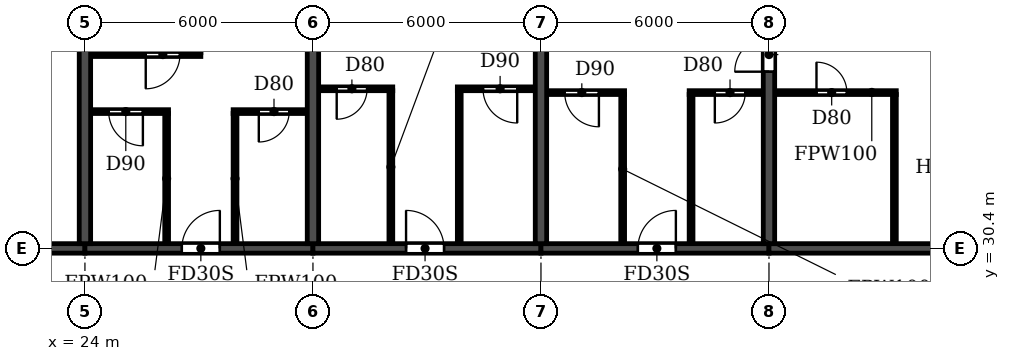
"""IFC4 building model, lengths in metres.
Left out: names, types, materials, properties, quantities, classifications, styles, units other than length and angle.
Written with IfcOpenShell. Run it as: python <this file> out.ifc"""

import sys

from ifc_helpers import new_model, si_unit, direction, frame, frame_2d, origin, place, context, subcontext, project, spatial, rectangle, extrude, element, fill, save


model = new_model("IFC4")
c1 = context("Model", 3, precision=1e-05, world=origin(), true_north=direction((0.0, 1.0)))
c2 = subcontext(c1, "Body", "Model", "MODEL_VIEW")
j1 = project(units=[si_unit("LENGTHUNIT", "METRE"), si_unit("PLANEANGLEUNIT", "RADIAN")], contexts=[c1])
p1 = place(None, origin())
s1 = spatial("IfcSite", under=j1, at=p1, CompositionType="ELEMENT")
p2 = place(p1, origin())
s2 = spatial("IfcBuilding", under=s1, at=p2, CompositionType="ELEMENT")
p3 = place(p2, frame((0.0, 0.0, 162.0)))
s3 = spatial("IfcBuildingStorey", under=s2, at=p3, CompositionType="ELEMENT", Elevation=162.0)
for number, where, z_axis, x_axis in (
    (1, (24.0, 30.525, 0.0), (0.0, 0.0, 1.0), (0.0, 1.0, 0.0)),
    (2, (30.0, 30.525, 0.0), (0.0, 0.0, 1.0), (0.0, 1.0, 0.0)),
    (3, (36.0, 30.525, 0.0), (0.0, 0.0, 1.0), (0.0, 1.0, 0.0)),
):
    element("IfcWall", number, at=place(p3, frame(where, z_axis=z_axis, x_axis=x_axis)), inside=s3, PredefinedType="SHEAR", context=c2, shape_type="SweptSolid", body=[
        extrude(rectangle(XDim=11.675, YDim=0.3, at=frame_2d((5.837, 0.0))), origin(), (0.0, 0.0, 1.0), 2.95),
    ])
p4 = place(p3, frame((42.0, 30.525, 0.0), z_axis=(0.0, 0.0, 1.0), x_axis=(0.0, 1.0, 0.0)))
e4 = element("IfcWall", 4, at=p4, inside=s3, PredefinedType="SHEAR", context=c2, shape_type="SweptSolid", body=[
    extrude(rectangle(XDim=11.675, YDim=0.3, at=frame_2d((5.837, 0.0))), origin(), (0.0, 0.0, 1.0), 2.95),
])
p5 = place(p4, frame((4.525, 0.0, 0.0)))
e5 = element("IfcOpeningElement", 5, at=p5, cuts=e4, PredefinedType="OPENING", context=c2, shape_type="SweptSolid", body=[
    extrude(rectangle(XDim=0.9, YDim=2.1, at=frame_2d((0.45, 1.05))), frame((0.0, 0.16, 0.0), z_axis=(0.0, -1.0, 0.0), x_axis=(1.0, 0.0, 0.0)), (0.0, 0.0, 1.0), 0.32),
])
p6 = place(p3, frame((18.2, 30.4, 0.0), z_axis=(0.0, 0.0, 1.0), x_axis=(1.0, 0.0, 0.0)))
e6 = element("IfcWall", 6, at=p6, inside=s3, PredefinedType="SHEAR", context=c2, shape_type="SweptSolid", body=[
    extrude(rectangle(XDim=5.8, YDim=0.25, at=frame_2d((2.9, 0.0))), origin(), (0.0, 0.0, 1.0), 2.35),
])
p7 = place(p6, frame((2.3, 0.0, 0.0)))
e7 = element("IfcOpeningElement", 7, at=p7, cuts=e6, PredefinedType="OPENING", context=c2, shape_type="SweptSolid", body=[
    extrude(rectangle(XDim=1.0, YDim=2.1, at=frame_2d((0.5, 1.05))), frame((0.0, 0.135, 0.0), z_axis=(0.0, -1.0, 0.0), x_axis=(1.0, 0.0, 0.0)), (0.0, 0.0, 1.0), 0.27),
])
p8 = place(p3, frame((24.0, 30.4, 0.0), z_axis=(0.0, 0.0, 1.0), x_axis=(1.0, 0.0, 0.0)))
e8 = element("IfcWall", 8, at=p8, inside=s3, PredefinedType="SHEAR", context=c2, shape_type="SweptSolid", body=[
    extrude(rectangle(XDim=6.0, YDim=0.25, at=frame_2d((3.0, 0.0))), origin(), (0.0, 0.0, 1.0), 2.35),
])
p9 = place(p8, frame((2.55, 0.0, 0.0)))
e9 = element("IfcOpeningElement", 9, at=p9, cuts=e8, PredefinedType="OPENING", context=c2, shape_type="SweptSolid", body=[
    extrude(rectangle(XDim=1.0, YDim=2.1, at=frame_2d((0.5, 1.05))), frame((0.0, 0.135, 0.0), z_axis=(0.0, -1.0, 0.0), x_axis=(1.0, 0.0, 0.0)), (0.0, 0.0, 1.0), 0.27),
])
p10 = place(p3, frame((30.0, 30.4, 0.0), z_axis=(0.0, 0.0, 1.0), x_axis=(1.0, 0.0, 0.0)))
e10 = element("IfcWall", 10, at=p10, inside=s3, PredefinedType="SHEAR", context=c2, shape_type="SweptSolid", body=[
    extrude(rectangle(XDim=6.0, YDim=0.25, at=frame_2d((3.0, 0.0))), origin(), (0.0, 0.0, 1.0), 2.35),
])
p11 = place(p10, frame((2.45, 0.0, 0.0)))
e11 = element("IfcOpeningElement", 11, at=p11, cuts=e10, PredefinedType="OPENING", context=c2, shape_type="SweptSolid", body=[
    extrude(rectangle(XDim=1.0, YDim=2.1, at=frame_2d((0.5, 1.05))), frame((0.0, 0.135, 0.0), z_axis=(0.0, -1.0, 0.0), x_axis=(1.0, 0.0, 0.0)), (0.0, 0.0, 1.0), 0.27),
])
p12 = place(p3, frame((36.0, 30.4, 0.0), z_axis=(0.0, 0.0, 1.0), x_axis=(1.0, 0.0, 0.0)))
e12 = element("IfcWall", 12, at=p12, inside=s3, PredefinedType="SHEAR", context=c2, shape_type="SweptSolid", body=[
    extrude(rectangle(XDim=6.0, YDim=0.25, at=frame_2d((3.0, 0.0))), origin(), (0.0, 0.0, 1.0), 2.35),
])
p13 = place(p12, frame((2.55, 0.0, 0.0)))
e13 = element("IfcOpeningElement", 13, at=p13, cuts=e12, PredefinedType="OPENING", context=c2, shape_type="SweptSolid", body=[
    extrude(rectangle(XDim=1.0, YDim=2.1, at=frame_2d((0.5, 1.05))), frame((0.0, 0.135, 0.0), z_axis=(0.0, -1.0, 0.0), x_axis=(1.0, 0.0, 0.0)), (0.0, 0.0, 1.0), 0.27),
])
p14 = place(p3, frame((42.0, 30.4, 0.0), z_axis=(0.0, 0.0, 1.0), x_axis=(1.0, 0.0, 0.0)))
e14 = element("IfcWall", 14, at=p14, inside=s3, PredefinedType="SHEAR", context=c2, shape_type="SweptSolid", body=[
    extrude(rectangle(XDim=6.0, YDim=0.25, at=frame_2d((3.0, 0.0))), origin(), (0.0, 0.0, 1.0), 2.35),
])
p15 = place(p3, frame((24.16, 34.0, 0.0), z_axis=(0.0, 0.0, 1.0), x_axis=(1.0, 0.0, 0.0)))
e15 = element("IfcWall", 15, at=p15, inside=s3, PredefinedType="PARTITIONING", context=c2, shape_type="SweptSolid", body=[
    extrude(rectangle(XDim=2.04, YDim=0.1, at=frame_2d((1.02, 0.0))), origin(), (0.0, 0.0, 1.0), 2.95),
])
p16 = place(p15, frame((0.465, 0.0, 0.0)))
e16 = element("IfcOpeningElement", 16, at=p16, cuts=e15, PredefinedType="OPENING", context=c2, shape_type="SweptSolid", body=[
    extrude(rectangle(XDim=0.9, YDim=2.1, at=frame_2d((0.45, 1.05))), frame((0.0, 0.06, 0.0), z_axis=(0.0, -1.0, 0.0), x_axis=(1.0, 0.0, 0.0)), (0.0, 0.0, 1.0), 0.12),
])
p17 = place(p3, frame((27.9, 34.0, 0.0), z_axis=(0.0, 0.0, 1.0), x_axis=(1.0, 0.0, 0.0)))
e17 = element("IfcWall", 17, at=p17, inside=s3, PredefinedType="PARTITIONING", context=c2, shape_type="SweptSolid", body=[
    extrude(rectangle(XDim=1.94, YDim=0.1, at=frame_2d((0.97, 0.0))), origin(), (0.0, 0.0, 1.0), 2.95),
])
p18 = place(p17, frame((0.675, 0.0, 0.0)))
e18 = element("IfcOpeningElement", 18, at=p18, cuts=e17, PredefinedType="OPENING", context=c2, shape_type="SweptSolid", body=[
    extrude(rectangle(XDim=0.8, YDim=2.1, at=frame_2d((0.4, 1.05))), frame((0.0, 0.06, 0.0), z_axis=(0.0, -1.0, 0.0), x_axis=(1.0, 0.0, 0.0)), (0.0, 0.0, 1.0), 0.12),
])
p19 = place(p3, frame((36.16, 34.5, 0.0), z_axis=(0.0, 0.0, 1.0), x_axis=(1.0, 0.0, 0.0)))
e19 = element("IfcWall", 19, at=p19, inside=s3, PredefinedType="PARTITIONING", context=c2, shape_type="SweptSolid", body=[
    extrude(rectangle(XDim=2.04, YDim=0.1, at=frame_2d((1.02, 0.0))), origin(), (0.0, 0.0, 1.0), 2.95),
])
p20 = place(p19, frame((0.465, 0.0, 0.0)))
e20 = element("IfcOpeningElement", 20, at=p20, cuts=e19, PredefinedType="OPENING", context=c2, shape_type="SweptSolid", body=[
    extrude(rectangle(XDim=0.9, YDim=2.1, at=frame_2d((0.45, 1.05))), frame((0.0, 0.06, 0.0), z_axis=(0.0, -1.0, 0.0), x_axis=(1.0, 0.0, 0.0)), (0.0, 0.0, 1.0), 0.12),
])
p21 = place(p3, frame((39.9, 34.5, 0.0), z_axis=(0.0, 0.0, 1.0), x_axis=(1.0, 0.0, 0.0)))
e21 = element("IfcWall", 21, at=p21, inside=s3, PredefinedType="PARTITIONING", context=c2, shape_type="SweptSolid", body=[
    extrude(rectangle(XDim=1.94, YDim=0.1, at=frame_2d((0.97, 0.0))), origin(), (0.0, 0.0, 1.0), 2.95),
])
p22 = place(p21, frame((0.675, 0.0, 0.0)))
e22 = element("IfcOpeningElement", 22, at=p22, cuts=e21, PredefinedType="OPENING", context=c2, shape_type="SweptSolid", body=[
    extrude(rectangle(XDim=0.8, YDim=2.1, at=frame_2d((0.4, 1.05))), frame((0.0, 0.06, 0.0), z_axis=(0.0, -1.0, 0.0), x_axis=(1.0, 0.0, 0.0)), (0.0, 0.0, 1.0), 0.12),
])
p23 = place(p3, frame((42.16, 34.5, 0.0), z_axis=(0.0, 0.0, 1.0), x_axis=(1.0, 0.0, 0.0)))
e23 = element("IfcWall", 23, at=p23, inside=s3, PredefinedType="PARTITIONING", context=c2, shape_type="SweptSolid", body=[
    extrude(rectangle(XDim=3.19, YDim=0.1, at=frame_2d((1.595, 0.0))), origin(), (0.0, 0.0, 1.0), 2.95),
])
p24 = place(p23, frame((1.09, 0.0, 0.0)))
e24 = element("IfcOpeningElement", 24, at=p24, cuts=e23, PredefinedType="OPENING", context=c2, shape_type="SweptSolid", body=[
    extrude(rectangle(XDim=0.8, YDim=2.1, at=frame_2d((0.4, 1.05))), frame((0.0, 0.06, 0.0), z_axis=(0.0, -1.0, 0.0), x_axis=(1.0, 0.0, 0.0)), (0.0, 0.0, 1.0), 0.12),
])
p25 = place(p3, frame((30.16, 34.6, 0.0), z_axis=(0.0, 0.0, 1.0), x_axis=(1.0, 0.0, 0.0)))
e25 = element("IfcWall", 25, at=p25, inside=s3, PredefinedType="PARTITIONING", context=c2, shape_type="SweptSolid", body=[
    extrude(rectangle(XDim=1.94, YDim=0.1, at=frame_2d((0.97, 0.0))), origin(), (0.0, 0.0, 1.0), 2.95),
])
p26 = place(p25, frame((0.465, 0.0, 0.0)))
e26 = element("IfcOpeningElement", 26, at=p26, cuts=e25, PredefinedType="OPENING", context=c2, shape_type="SweptSolid", body=[
    extrude(rectangle(XDim=0.8, YDim=2.1, at=frame_2d((0.4, 1.05))), frame((0.0, 0.06, 0.0), z_axis=(0.0, -1.0, 0.0), x_axis=(1.0, 0.0, 0.0)), (0.0, 0.0, 1.0), 0.12),
])
p27 = place(p3, frame((33.8, 34.6, 0.0), z_axis=(0.0, 0.0, 1.0), x_axis=(1.0, 0.0, 0.0)))
e27 = element("IfcWall", 27, at=p27, inside=s3, PredefinedType="PARTITIONING", context=c2, shape_type="SweptSolid", body=[
    extrude(rectangle(XDim=2.04, YDim=0.1, at=frame_2d((1.02, 0.0))), origin(), (0.0, 0.0, 1.0), 2.95),
])
p28 = place(p27, frame((0.675, 0.0, 0.0)))
e28 = element("IfcOpeningElement", 28, at=p28, cuts=e27, PredefinedType="OPENING", context=c2, shape_type="SweptSolid", body=[
    extrude(rectangle(XDim=0.9, YDim=2.1, at=frame_2d((0.45, 1.05))), frame((0.0, 0.06, 0.0), z_axis=(0.0, -1.0, 0.0), x_axis=(1.0, 0.0, 0.0)), (0.0, 0.0, 1.0), 0.12),
])
p29 = place(p3, frame((24.16, 35.5, 0.0), z_axis=(0.0, 0.0, 1.0), x_axis=(1.0, 0.0, 0.0)))
e29 = element("IfcWall", 29, at=p29, inside=s3, PredefinedType="PARTITIONING", context=c2, shape_type="SweptSolid", body=[
    extrude(rectangle(XDim=2.89, YDim=0.1, at=frame_2d((1.445, 0.0))), origin(), (0.0, 0.0, 1.0), 2.95),
])
p30 = place(p29, frame((1.44, 0.0, 0.0)))
e30 = element("IfcOpeningElement", 30, at=p30, cuts=e29, PredefinedType="OPENING", context=c2, shape_type="SweptSolid", body=[
    extrude(rectangle(XDim=0.9, YDim=2.1, at=frame_2d((0.45, 1.05))), frame((0.0, 0.06, 0.0), z_axis=(0.0, -1.0, 0.0), x_axis=(1.0, 0.0, 0.0)), (0.0, 0.0, 1.0), 0.12),
])
for number, where, z_axis, x_axis in (
    (31, (26.15, 30.535, 0.0), (0.0, 0.0, 1.0), (0.0, 1.0, 0.0)),
    (32, (27.95, 30.535, 0.0), (0.0, 0.0, 1.0), (0.0, 1.0, 0.0)),
):
    element("IfcWall", number, at=place(p3, frame(where, z_axis=z_axis, x_axis=x_axis)), inside=s3, PredefinedType="PARTITIONING", context=c2, shape_type="SweptSolid", body=[
        extrude(rectangle(XDim=3.415, YDim=0.1, at=frame_2d((1.708, 0.0))), origin(), (0.0, 0.0, 1.0), 2.95),
    ])
for number, where, z_axis, x_axis in (
    (33, (32.05, 30.535, 0.0), (0.0, 0.0, 1.0), (0.0, 1.0, 0.0)),
    (34, (33.85, 30.535, 0.0), (0.0, 0.0, 1.0), (0.0, 1.0, 0.0)),
):
    element("IfcWall", number, at=place(p3, frame(where, z_axis=z_axis, x_axis=x_axis)), inside=s3, PredefinedType="PARTITIONING", context=c2, shape_type="SweptSolid", body=[
        extrude(rectangle(XDim=4.015, YDim=0.1, at=frame_2d((2.008, 0.0))), origin(), (0.0, 0.0, 1.0), 2.95),
    ])
for number, where, z_axis, x_axis in (
    (35, (38.15, 30.535, 0.0), (0.0, 0.0, 1.0), (0.0, 1.0, 0.0)),
    (36, (39.95, 30.535, 0.0), (0.0, 0.0, 1.0), (0.0, 1.0, 0.0)),
    (37, (45.3, 30.535, 0.0), (0.0, 0.0, 1.0), (0.0, 1.0, 0.0)),
):
    element("IfcWall", number, at=place(p3, frame(where, z_axis=z_axis, x_axis=x_axis)), inside=s3, PredefinedType="PARTITIONING", context=c2, shape_type="SweptSolid", body=[
        extrude(rectangle(XDim=3.915, YDim=0.1, at=frame_2d((1.958, 0.0))), origin(), (0.0, 0.0, 1.0), 2.95),
    ])
p31 = place(p16, frame((0.9, 0.0, 0.0), z_axis=(0.0, 0.0, 1.0), x_axis=(-1.0, 0.0, 0.0)))
e38 = element("IfcDoor", 38, at=p31, inside=s3, OperationType="SINGLE_SWING_LEFT", PredefinedType="DOOR", context=c2, shape_type="SweptSolid", body=[
    extrude(rectangle(XDim=0.9, YDim=2.1, at=frame_2d((0.45, 1.05))), frame((0.0, 0.025, 0.0), z_axis=(0.0, -1.0, 0.0), x_axis=(1.0, 0.0, 0.0)), (0.0, 0.0, 1.0), 0.05),
])
fill(e16, e38)
p32 = place(p30, frame((0.9, 0.0, 0.0), z_axis=(0.0, 0.0, 1.0), x_axis=(-1.0, 0.0, 0.0)))
e39 = element("IfcDoor", 39, at=p32, inside=s3, OperationType="SINGLE_SWING_RIGHT", PredefinedType="DOOR", context=c2, shape_type="SweptSolid", body=[
    extrude(rectangle(XDim=0.9, YDim=2.1, at=frame_2d((0.45, 1.05))), frame((0.0, 0.025, 0.0), z_axis=(0.0, -1.0, 0.0), x_axis=(1.0, 0.0, 0.0)), (0.0, 0.0, 1.0), 0.05),
])
fill(e30, e39)
p33 = place(p9, origin())
e40 = element("IfcDoor", 40, at=p33, inside=s3, OperationType="SINGLE_SWING_RIGHT", PredefinedType="DOOR", context=c2, shape_type="SweptSolid", body=[
    extrude(rectangle(XDim=1.0, YDim=2.1, at=frame_2d((0.5, 1.05))), frame((0.0, 0.025, 0.0), z_axis=(0.0, -1.0, 0.0), x_axis=(1.0, 0.0, 0.0)), (0.0, 0.0, 1.0), 0.05),
])
fill(e9, e40)
p34 = place(p18, frame((0.8, 0.0, 0.0), z_axis=(0.0, 0.0, 1.0), x_axis=(-1.0, 0.0, 0.0)))
e41 = element("IfcDoor", 41, at=p34, inside=s3, OperationType="SINGLE_SWING_RIGHT", PredefinedType="DOOR", context=c2, shape_type="SweptSolid", body=[
    extrude(rectangle(XDim=0.8, YDim=2.1, at=frame_2d((0.4, 1.05))), frame((0.0, 0.025, 0.0), z_axis=(0.0, -1.0, 0.0), x_axis=(1.0, 0.0, 0.0)), (0.0, 0.0, 1.0), 0.05),
])
fill(e18, e41)
p35 = place(p26, frame((0.8, 0.0, 0.0), z_axis=(0.0, 0.0, 1.0), x_axis=(-1.0, 0.0, 0.0)))
e42 = element("IfcDoor", 42, at=p35, inside=s3, OperationType="SINGLE_SWING_RIGHT", PredefinedType="DOOR", context=c2, shape_type="SweptSolid", body=[
    extrude(rectangle(XDim=0.8, YDim=2.1, at=frame_2d((0.4, 1.05))), frame((0.0, 0.025, 0.0), z_axis=(0.0, -1.0, 0.0), x_axis=(1.0, 0.0, 0.0)), (0.0, 0.0, 1.0), 0.05),
])
fill(e26, e42)
p36 = place(p11, origin())
e43 = element("IfcDoor", 43, at=p36, inside=s3, OperationType="SINGLE_SWING_LEFT", PredefinedType="DOOR", context=c2, shape_type="SweptSolid", body=[
    extrude(rectangle(XDim=1.0, YDim=2.1, at=frame_2d((0.5, 1.05))), frame((0.0, 0.025, 0.0), z_axis=(0.0, -1.0, 0.0), x_axis=(1.0, 0.0, 0.0)), (0.0, 0.0, 1.0), 0.05),
])
fill(e11, e43)
p37 = place(p28, frame((0.9, 0.0, 0.0), z_axis=(0.0, 0.0, 1.0), x_axis=(-1.0, 0.0, 0.0)))
e44 = element("IfcDoor", 44, at=p37, inside=s3, OperationType="SINGLE_SWING_LEFT", PredefinedType="DOOR", context=c2, shape_type="SweptSolid", body=[
    extrude(rectangle(XDim=0.9, YDim=2.1, at=frame_2d((0.45, 1.05))), frame((0.0, 0.025, 0.0), z_axis=(0.0, -1.0, 0.0), x_axis=(1.0, 0.0, 0.0)), (0.0, 0.0, 1.0), 0.05),
])
fill(e28, e44)
p38 = place(p24, origin())
e45 = element("IfcDoor", 45, at=p38, inside=s3, OperationType="SINGLE_SWING_LEFT", PredefinedType="DOOR", context=c2, shape_type="SweptSolid", body=[
    extrude(rectangle(XDim=0.8, YDim=2.1, at=frame_2d((0.4, 1.05))), frame((0.0, 0.025, 0.0), z_axis=(0.0, -1.0, 0.0), x_axis=(1.0, 0.0, 0.0)), (0.0, 0.0, 1.0), 0.05),
])
fill(e24, e45)
p39 = place(p20, frame((0.9, 0.0, 0.0), z_axis=(0.0, 0.0, 1.0), x_axis=(-1.0, 0.0, 0.0)))
e46 = element("IfcDoor", 46, at=p39, inside=s3, OperationType="SINGLE_SWING_LEFT", PredefinedType="DOOR", context=c2, shape_type="SweptSolid", body=[
    extrude(rectangle(XDim=0.9, YDim=2.1, at=frame_2d((0.45, 1.05))), frame((0.0, 0.025, 0.0), z_axis=(0.0, -1.0, 0.0), x_axis=(1.0, 0.0, 0.0)), (0.0, 0.0, 1.0), 0.05),
])
fill(e20, e46)
p40 = place(p13, origin())
e47 = element("IfcDoor", 47, at=p40, inside=s3, OperationType="SINGLE_SWING_RIGHT", PredefinedType="DOOR", context=c2, shape_type="SweptSolid", body=[
    extrude(rectangle(XDim=1.0, YDim=2.1, at=frame_2d((0.5, 1.05))), frame((0.0, 0.025, 0.0), z_axis=(0.0, -1.0, 0.0), x_axis=(1.0, 0.0, 0.0)), (0.0, 0.0, 1.0), 0.05),
])
fill(e13, e47)
p41 = place(p22, frame((0.8, 0.0, 0.0), z_axis=(0.0, 0.0, 1.0), x_axis=(-1.0, 0.0, 0.0)))
e48 = element("IfcDoor", 48, at=p41, inside=s3, OperationType="SINGLE_SWING_RIGHT", PredefinedType="DOOR", context=c2, shape_type="SweptSolid", body=[
    extrude(rectangle(XDim=0.8, YDim=2.1, at=frame_2d((0.4, 1.05))), frame((0.0, 0.025, 0.0), z_axis=(0.0, -1.0, 0.0), x_axis=(1.0, 0.0, 0.0)), (0.0, 0.0, 1.0), 0.05),
])
fill(e22, e48)
p42 = place(p5, origin())
e49 = element("IfcDoor", 49, at=p42, inside=s3, OperationType="SINGLE_SWING_LEFT", PredefinedType="DOOR", context=c2, shape_type="SweptSolid", body=[
    extrude(rectangle(XDim=0.9, YDim=2.1, at=frame_2d((0.45, 1.05))), frame((0.0, 0.025, 0.0), z_axis=(0.0, -1.0, 0.0), x_axis=(1.0, 0.0, 0.0)), (0.0, 0.0, 1.0), 0.05),
])
fill(e5, e49)
save(model, sys.argv[1])
